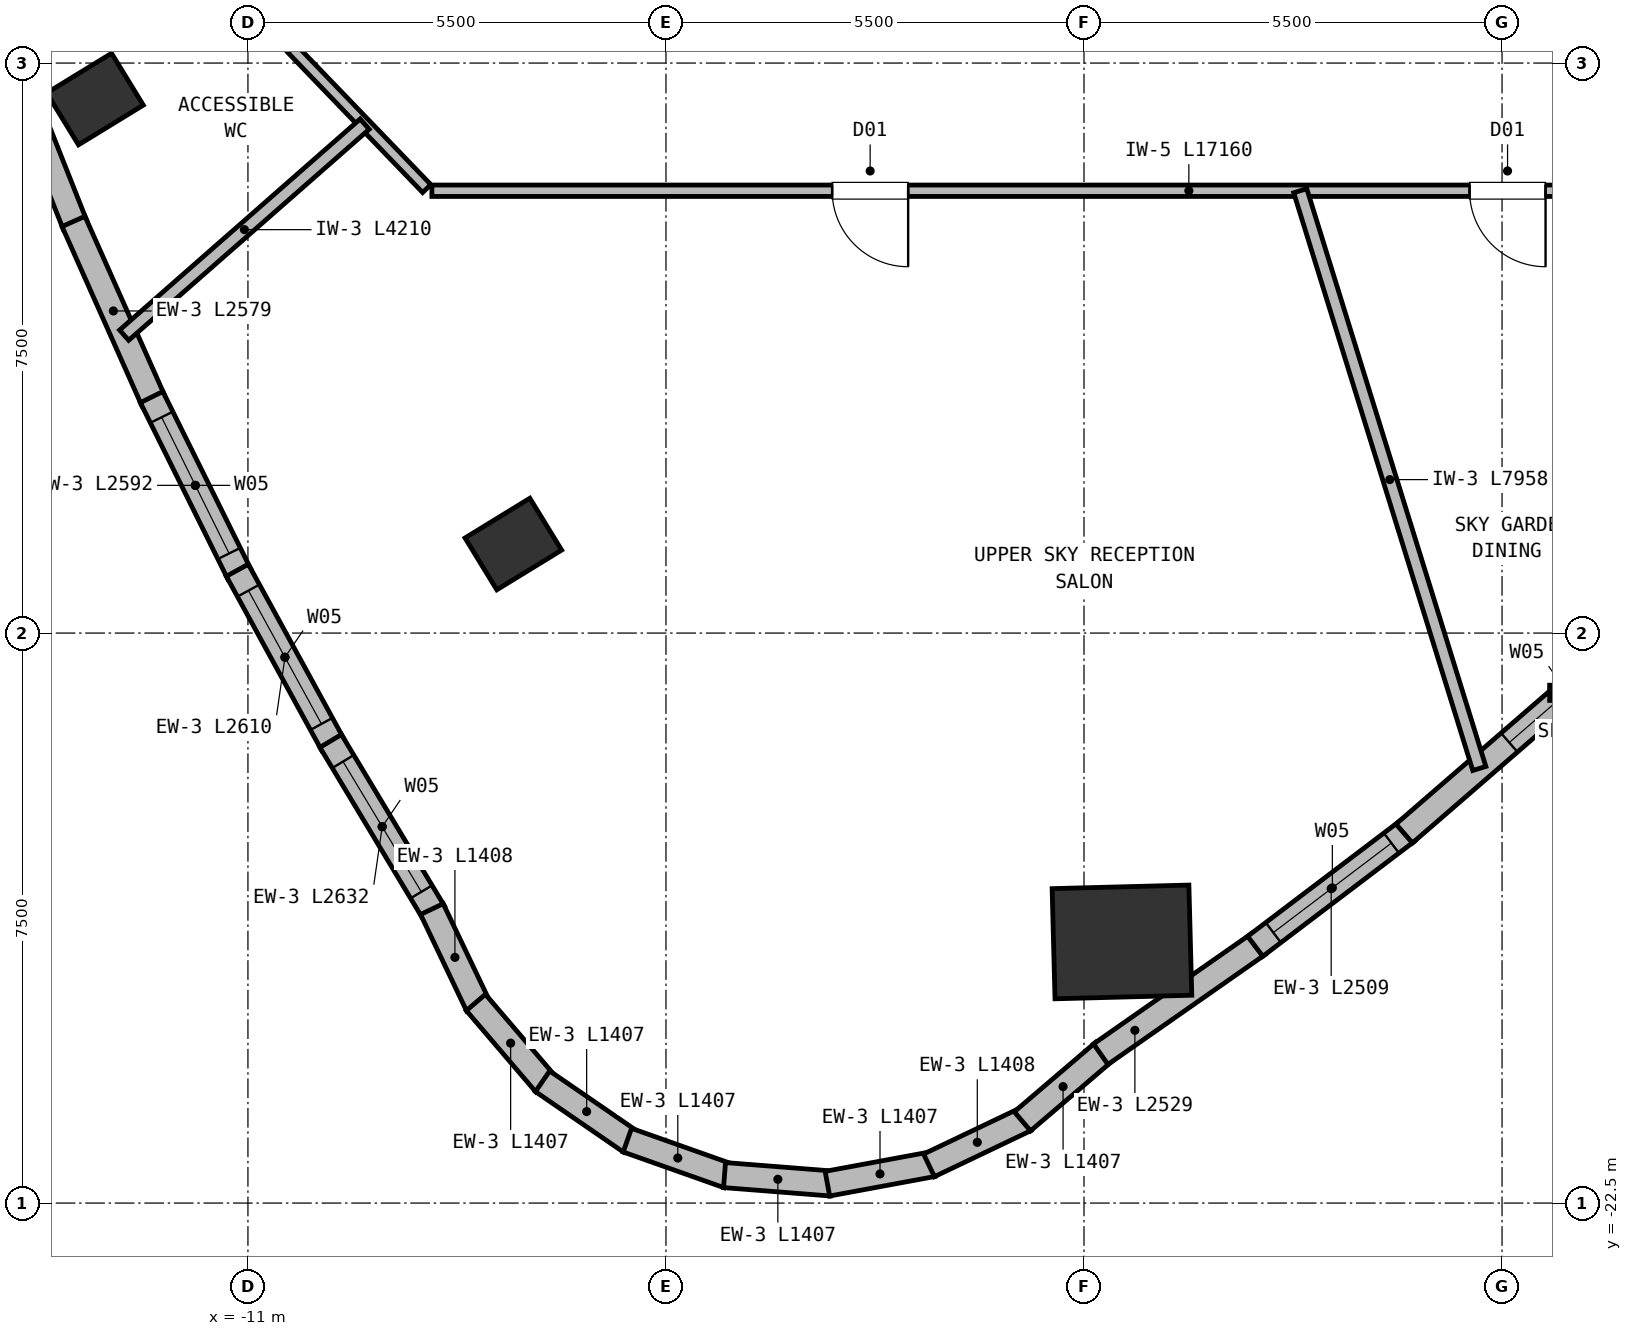
"""IFC4 building model, lengths in metres.
Left out: names, types, materials, properties, quantities, classifications, styles, units other than length and angle.
Written with IfcOpenShell. Run it as: python <this file> out.ifc"""

import sys

from ifc_helpers import new_model, si_unit, direction, frame, frame_2d, origin, origin_2d, place, context, subcontext, project, spatial, rectangle, extrude, element, fill, save


model = new_model("IFC4")
c1 = context("Model", 3, precision=1e-05, world=origin(), true_north=direction((0.0, 1.0)))
c2 = subcontext(c1, "Body", "Model", "MODEL_VIEW")
j1 = project(units=[si_unit("LENGTHUNIT", "METRE"), si_unit("PLANEANGLEUNIT", "RADIAN")], contexts=[c1])
p1 = place(None, origin())
s1 = spatial("IfcSite", under=j1, at=p1, CompositionType="ELEMENT")
p2 = place(p1, origin())
s2 = spatial("IfcBuilding", under=s1, at=p2, CompositionType="ELEMENT")
p3 = place(p2, frame((0.0, 0.0, 173.75)))
s3 = spatial("IfcBuildingStorey", under=s2, at=p3, CompositionType="ELEMENT", Elevation=173.75)
for number, where, z_axis, x_axis in (
    (1, (-13.012, -7.974, 0.0), (0.0, 0.0, 1.0), (-0.522, 0.853, 0.0)),
    (2, (-7.508, -13.828, 0.0), (0.0, 0.0, 1.0), (-0.522, 0.853, 0.0)),
):
    element("IfcColumn", number, at=place(p3, frame(where, z_axis=z_axis, x_axis=x_axis)), inside=s3, PredefinedType="COLUMN", context=c2, shape_type="SweptSolid", body=[
        extrude(rectangle(XDim=0.8, YDim=1.0, at=origin_2d()), origin(), (0.0, 0.0, 1.0), 4.5),
    ])
p4 = place(p3, frame((0.499, -19.064, 0.0), z_axis=(0.0, 0.0, 1.0), x_axis=(-0.026176948308, 0.999657324976, 0.0)))
e3 = element("IfcColumn", 3, at=p4, inside=s3, PredefinedType="COLUMN", context=c2, shape_type="SweptSolid", body=[
    extrude(rectangle(XDim=1.45, YDim=1.8, at=origin_2d()), origin(), (0.0, 0.0, 1.0), 4.5),
])
p5 = place(p3, frame((-13.275, -9.63, 0.0), z_axis=(0.0, 0.0, 1.0), x_axis=(-0.368145960329, 0.929768009717, 0.0)))
e4 = element("IfcWall", 4, at=p5, inside=s3, PredefinedType="SOLIDWALL", context=c2, shape_type="SweptSolid", body=[
    extrude(rectangle(XDim=2.57, YDim=0.33, at=frame_2d((1.285, 0.0))), origin(), (0.0, 0.0, 1.0), 4.21),
])
p6 = place(p3, frame((-12.246, -11.94, 0.0), z_axis=(0.0, 0.0, 1.0), x_axis=(-0.406630213632, 0.913592835656, 0.0)))
e5 = element("IfcWall", 5, at=p6, inside=s3, PredefinedType="SOLIDWALL", context=c2, shape_type="SweptSolid", body=[
    extrude(rectangle(XDim=2.579, YDim=0.33, at=frame_2d((1.29, 0.0))), origin(), (0.0, 0.0, 1.0), 4.21),
])
p7 = place(p3, frame((-11.116, -14.218, 0.0), z_axis=(0.0, 0.0, 1.0), x_axis=(-0.44393335953, 0.896059803973, 0.0)))
e6 = element("IfcWall", 6, at=p7, inside=s3, PredefinedType="SOLIDWALL", context=c2, shape_type="SweptSolid", body=[
    extrude(rectangle(XDim=2.593, YDim=0.33, at=frame_2d((1.296, 0.0))), origin(), (0.0, 0.0, 1.0), 4.21),
])
p8 = place(p7, frame((0.296, 0.0, 0.72)))
e7 = element("IfcOpeningElement", 7, at=p8, cuts=e6, PredefinedType="OPENING", context=c2, shape_type="SweptSolid", body=[
    extrude(rectangle(XDim=2.0, YDim=2.15, at=frame_2d((1.0, 1.075))), frame((0.0, 0.175, 0.0), z_axis=(0.0, -1.0, 0.0), x_axis=(1.0, 0.0, 0.0)), (0.0, 0.0, 1.0), 0.35),
])
p9 = place(p3, frame((-9.886, -16.463, 0.0), z_axis=(0.0, 0.0, 1.0), x_axis=(-0.480129576196, 0.877197577551, 0.0)))
e8 = element("IfcWall", 8, at=p9, inside=s3, PredefinedType="SOLIDWALL", context=c2, shape_type="SweptSolid", body=[
    extrude(rectangle(XDim=2.61, YDim=0.33, at=frame_2d((1.305, 0.0))), origin(), (0.0, 0.0, 1.0), 4.21),
])
p10 = place(p9, frame((0.305, 0.0, 0.72)))
e9 = element("IfcOpeningElement", 9, at=p10, cuts=e8, PredefinedType="OPENING", context=c2, shape_type="SweptSolid", body=[
    extrude(rectangle(XDim=2.0, YDim=2.15, at=frame_2d((1.0, 1.075))), frame((0.0, 0.175, 0.0), z_axis=(0.0, -1.0, 0.0), x_axis=(1.0, 0.0, 0.0)), (0.0, 0.0, 1.0), 0.35),
])
p11 = place(p3, frame((-8.556, -18.676, 0.0), z_axis=(0.0, 0.0, 1.0), x_axis=(-0.514973174708, 0.857206293334, 0.0)))
e10 = element("IfcWall", 10, at=p11, inside=s3, PredefinedType="SOLIDWALL", context=c2, shape_type="SweptSolid", body=[
    extrude(rectangle(XDim=2.632, YDim=0.33, at=frame_2d((1.316, 0.0))), origin(), (0.0, 0.0, 1.0), 4.21),
])
p12 = place(p11, frame((0.316, 0.0, 0.72)))
e11 = element("IfcOpeningElement", 11, at=p12, cuts=e10, PredefinedType="OPENING", context=c2, shape_type="SweptSolid", body=[
    extrude(rectangle(XDim=2.0, YDim=2.15, at=frame_2d((1.0, 1.075))), frame((0.0, 0.175, 0.0), z_axis=(0.0, -1.0, 0.0), x_axis=(1.0, 0.0, 0.0)), (0.0, 0.0, 1.0), 0.35),
])
p13 = place(p3, frame((-7.974, -19.902, 0.0), z_axis=(0.0, 0.0, 1.0), x_axis=(-0.43048556818, 0.902597460438, 0.0)))
e12 = element("IfcWall", 12, at=p13, inside=s3, PredefinedType="SOLIDWALL", context=c2, shape_type="SweptSolid", body=[
    extrude(rectangle(XDim=1.408, YDim=0.33, at=frame_2d((0.704, 0.0))), origin(), (0.0, 0.0, 1.0), 4.21),
])
for number, where, z_axis, x_axis in (
    (13, (-7.087, -20.931, 0.0), (0.0, 0.0, 1.0), (-0.649, 0.761, 0.0)),
    (14, (-5.964, -21.695, 0.0), (0.0, 0.0, 1.0), (-0.824, 0.566, 0.0)),
    (15, (-4.681, -22.142, 0.0), (0.0, 0.0, 1.0), (-0.943, 0.334, 0.0)),
    (16, (-3.326, -22.242, 0.0), (0.0, 0.0, 1.0), (-0.997, 0.078, 0.0)),
    (17, (-1.992, -21.988, 0.0), (0.0, 0.0, 1.0), (-0.983, -0.182, 0.0)),
):
    element("IfcWall", number, at=place(p3, frame(where, z_axis=z_axis, x_axis=x_axis)), inside=s3, PredefinedType="SOLIDWALL", context=c2, shape_type="SweptSolid", body=[
        extrude(rectangle(XDim=1.407, YDim=0.33, at=frame_2d((0.704, 0.0))), origin(), (0.0, 0.0, 1.0), 4.21),
    ])
p14 = place(p3, frame((-0.769, -21.398, 0.0), z_axis=(0.0, 0.0, 1.0), x_axis=(-0.902597460438, -0.43048556818, 0.0)))
e18 = element("IfcWall", 18, at=p14, inside=s3, PredefinedType="SOLIDWALL", context=c2, shape_type="SweptSolid", body=[
    extrude(rectangle(XDim=1.408, YDim=0.33, at=frame_2d((0.704, 0.0))), origin(), (0.0, 0.0, 1.0), 4.21),
])
p15 = place(p3, frame((0.26, -20.511, 0.0), z_axis=(0.0, 0.0, 1.0), x_axis=(-0.760357614302, -0.649504656159, 0.0)))
e19 = element("IfcWall", 19, at=p15, inside=s3, PredefinedType="SOLIDWALL", context=c2, shape_type="SweptSolid", body=[
    extrude(rectangle(XDim=1.407, YDim=0.33, at=frame_2d((0.704, 0.0))), origin(), (0.0, 0.0, 1.0), 4.21),
])
p16 = place(p3, frame((2.293, -19.092, 0.0), z_axis=(0.0, 0.0, 1.0), x_axis=(-0.819594578162, -0.572943913003, 0.0)))
e20 = element("IfcWall", 20, at=p16, inside=s3, PredefinedType="SOLIDWALL", context=c2, shape_type="SweptSolid", body=[
    extrude(rectangle(XDim=2.529, YDim=0.33, at=frame_2d((1.265, 0.0))), origin(), (0.0, 0.0, 1.0), 4.21),
])
p17 = place(p3, frame((4.252, -17.606, 0.0), z_axis=(0.0, 0.0, 1.0), x_axis=(-0.7968948115, -0.60411808399, 0.0)))
e21 = element("IfcWall", 21, at=p17, inside=s3, PredefinedType="SOLIDWALL", context=c2, shape_type="SweptSolid", body=[
    extrude(rectangle(XDim=2.509, YDim=0.33, at=frame_2d((1.254, 0.0))), origin(), (0.0, 0.0, 1.0), 4.21),
])
p18 = place(p17, frame((0.26, 0.0, 0.72)))
e22 = element("IfcOpeningElement", 22, at=p18, cuts=e21, PredefinedType="OPENING", context=c2, shape_type="SweptSolid", body=[
    extrude(rectangle(XDim=1.95, YDim=2.15, at=frame_2d((0.975, 1.075))), frame((0.0, 0.175, 0.0), z_axis=(0.0, -1.0, 0.0), x_axis=(1.0, 0.0, 0.0)), (0.0, 0.0, 1.0), 0.35),
])
p19 = place(p3, frame((8.489, -13.935, 0.0), z_axis=(0.0, 0.0, 1.0), x_axis=(-0.755999446819, -0.654572254536, 0.0)))
e23 = element("IfcWall", 23, at=p19, inside=s3, PredefinedType="SOLIDWALL", context=c2, shape_type="SweptSolid", body=[
    extrude(rectangle(XDim=5.656, YDim=0.33, at=frame_2d((2.828, 0.0))), origin(), (0.0, 0.0, 1.0), 4.21),
])
p20 = place(p19, frame((1.828, 0.0, 0.72)))
e24 = element("IfcOpeningElement", 24, at=p20, cuts=e23, PredefinedType="OPENING", context=c2, shape_type="SweptSolid", body=[
    extrude(rectangle(XDim=2.0, YDim=2.15, at=frame_2d((1.0, 1.075))), frame((0.0, 0.175, 0.0), z_axis=(0.0, -1.0, 0.0), x_axis=(1.0, 0.0, 0.0)), (0.0, 0.0, 1.0), 0.35),
])
p21 = place(p3, frame((8.58, -9.18, 0.0), z_axis=(0.0, 0.0, 1.0), x_axis=(-1.0, 0.0, 0.0)))
e25 = element("IfcWall", 25, at=p21, inside=s3, PredefinedType="PARTITIONING", context=c2, shape_type="SweptSolid", body=[
    extrude(rectangle(XDim=17.16, YDim=0.15, at=frame_2d((8.58, 0.0))), origin(), (0.0, 0.0, 1.0), 3.89),
])
p22 = place(p21, frame((2.507, 0.0, 0.0)))
e26 = element("IfcOpeningElement", 26, at=p22, cuts=e25, PredefinedType="OPENING", context=c2, shape_type="SweptSolid", body=[
    extrude(rectangle(XDim=1.0, YDim=2.15, at=frame_2d((0.5, 1.075))), frame((0.0, 0.085, 0.0), z_axis=(0.0, -1.0, 0.0), x_axis=(1.0, 0.0, 0.0)), (0.0, 0.0, 1.0), 0.17),
])
p23 = place(p21, frame((10.894, 0.0, 0.0)))
e27 = element("IfcOpeningElement", 27, at=p23, cuts=e25, PredefinedType="OPENING", context=c2, shape_type="SweptSolid", body=[
    extrude(rectangle(XDim=1.0, YDim=2.15, at=frame_2d((0.5, 1.075))), frame((0.0, 0.085, 0.0), z_axis=(0.0, -1.0, 0.0), x_axis=(1.0, 0.0, 0.0)), (0.0, 0.0, 1.0), 0.17),
])
p24 = place(p3, frame((-8.648, -9.151, 0.0), z_axis=(0.0, 0.0, 1.0), x_axis=(-0.693764562202, 0.720201869085, 0.0)))
e28 = element("IfcWall", 28, at=p24, inside=s3, PredefinedType="PARTITIONING", context=c2, shape_type="SweptSolid", body=[
    extrude(rectangle(XDim=2.558, YDim=0.15, at=frame_2d((1.279, 0.0))), origin(), (0.0, 0.0, 1.0), 3.89),
])
p25 = place(p3, frame((-9.464, -8.304, 0.0), z_axis=(0.0, 0.0, 1.0), x_axis=(-0.751703129052, -0.659501634398, 0.0)))
e29 = element("IfcWall", 29, at=p25, inside=s3, PredefinedType="PARTITIONING", context=c2, shape_type="SweptSolid", body=[
    extrude(rectangle(XDim=4.21, YDim=0.18, at=frame_2d((2.105, 0.0))), origin(), (0.0, 0.0, 1.0), 4.21),
])
p26 = place(p3, frame((2.845, -9.18, 0.0), z_axis=(0.0, 0.0, 1.0), x_axis=(0.296001653507, -0.955187427221, 0.0)))
e30 = element("IfcWall", 30, at=p26, inside=s3, PredefinedType="PARTITIONING", context=c2, shape_type="SweptSolid", body=[
    extrude(rectangle(XDim=7.958, YDim=0.18, at=frame_2d((3.979, 0.0))), origin(), (0.0, 0.0, 1.0), 4.21),
])
p27 = place(p8, origin())
e31 = element("IfcWindow", 31, at=p27, inside=s3, PartitioningType="SINGLE_PANEL", PredefinedType="WINDOW", context=c2, shape_type="SweptSolid", body=[
    extrude(rectangle(XDim=2.0, YDim=2.15, at=frame_2d((1.0, 1.075))), frame((0.0, 0.03, 0.0), z_axis=(0.0, -1.0, 0.0), x_axis=(1.0, 0.0, 0.0)), (0.0, 0.0, 1.0), 0.06),
])
fill(e7, e31)
p28 = place(p10, origin())
e32 = element("IfcWindow", 32, at=p28, inside=s3, PartitioningType="SINGLE_PANEL", PredefinedType="WINDOW", context=c2, shape_type="SweptSolid", body=[
    extrude(rectangle(XDim=2.0, YDim=2.15, at=frame_2d((1.0, 1.075))), frame((0.0, 0.03, 0.0), z_axis=(0.0, -1.0, 0.0), x_axis=(1.0, 0.0, 0.0)), (0.0, 0.0, 1.0), 0.06),
])
fill(e9, e32)
p29 = place(p12, origin())
e33 = element("IfcWindow", 33, at=p29, inside=s3, PartitioningType="SINGLE_PANEL", PredefinedType="WINDOW", context=c2, shape_type="SweptSolid", body=[
    extrude(rectangle(XDim=2.0, YDim=2.15, at=frame_2d((1.0, 1.075))), frame((0.0, 0.03, 0.0), z_axis=(0.0, -1.0, 0.0), x_axis=(1.0, 0.0, 0.0)), (0.0, 0.0, 1.0), 0.06),
])
fill(e11, e33)
p30 = place(p18, origin())
e34 = element("IfcWindow", 34, at=p30, inside=s3, PartitioningType="SINGLE_PANEL", PredefinedType="WINDOW", context=c2, shape_type="SweptSolid", body=[
    extrude(rectangle(XDim=1.95, YDim=2.15, at=frame_2d((0.975, 1.075))), frame((0.0, 0.03, 0.0), z_axis=(0.0, -1.0, 0.0), x_axis=(1.0, 0.0, 0.0)), (0.0, 0.0, 1.0), 0.06),
])
fill(e22, e34)
p31 = place(p20, origin())
e35 = element("IfcWindow", 35, at=p31, inside=s3, PartitioningType="SINGLE_PANEL", PredefinedType="WINDOW", context=c2, shape_type="SweptSolid", body=[
    extrude(rectangle(XDim=2.0, YDim=2.15, at=frame_2d((1.0, 1.075))), frame((0.0, 0.03, 0.0), z_axis=(0.0, -1.0, 0.0), x_axis=(1.0, 0.0, 0.0)), (0.0, 0.0, 1.0), 0.06),
])
fill(e24, e35)
p32 = place(p22, origin())
e36 = element("IfcDoor", 36, at=p32, inside=s3, OperationType="SINGLE_SWING_LEFT", PredefinedType="DOOR", context=c2, shape_type="SweptSolid", body=[
    extrude(rectangle(XDim=1.0, YDim=2.15, at=frame_2d((0.5, 1.075))), frame((0.0, 0.025, 0.0), z_axis=(0.0, -1.0, 0.0), x_axis=(1.0, 0.0, 0.0)), (0.0, 0.0, 1.0), 0.05),
])
fill(e26, e36)
p33 = place(p23, origin())
e37 = element("IfcDoor", 37, at=p33, inside=s3, OperationType="SINGLE_SWING_LEFT", PredefinedType="DOOR", context=c2, shape_type="SweptSolid", body=[
    extrude(rectangle(XDim=1.0, YDim=2.15, at=frame_2d((0.5, 1.075))), frame((0.0, 0.025, 0.0), z_axis=(0.0, -1.0, 0.0), x_axis=(1.0, 0.0, 0.0)), (0.0, 0.0, 1.0), 0.05),
])
fill(e27, e37)
save(model, sys.argv[1])
